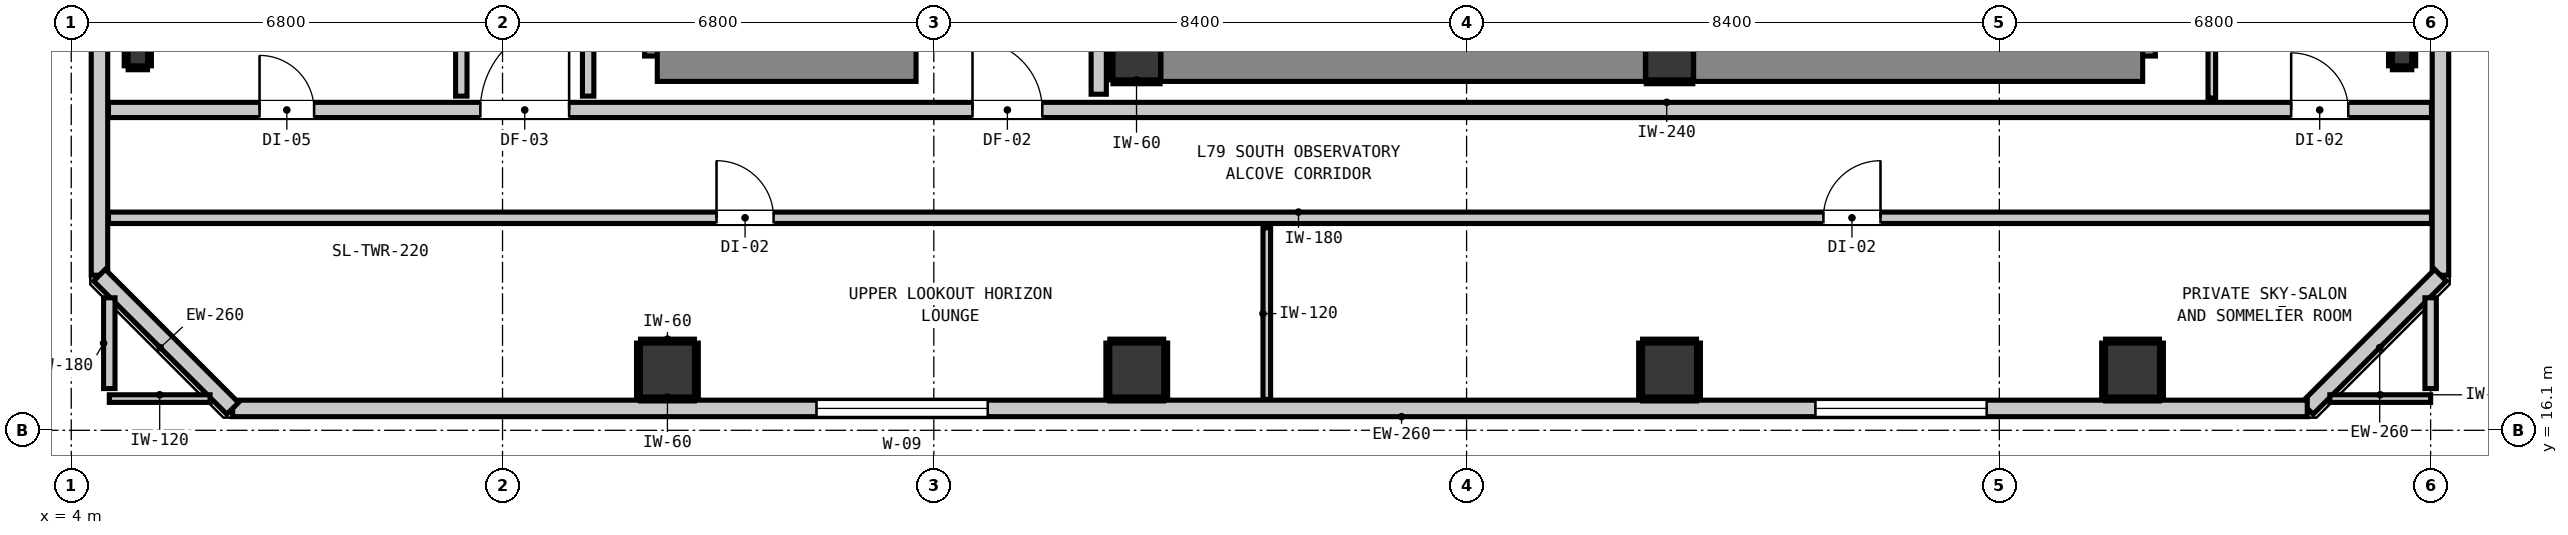
"""IFC4 building model, lengths in metres.
Left out: names, types, materials, properties, quantities, classifications, styles, units other than length and angle.
Written with IfcOpenShell. Run it as: python <this file> out.ifc"""

import sys

from ifc_helpers import new_model, si_unit, direction, frame, frame_2d, origin, origin_2d, place, context, subcontext, project, spatial, rectangle, i_section, extrude, element, fill, save


model = new_model("IFC4")
c1 = context("Model", 3, precision=1e-05, world=origin(), true_north=direction((0.0, 1.0)))
c2 = subcontext(c1, "Body", "Model", "MODEL_VIEW")
j1 = project(units=[si_unit("LENGTHUNIT", "METRE"), si_unit("PLANEANGLEUNIT", "RADIAN")], contexts=[c1])
p1 = place(None, origin())
s1 = spatial("IfcSite", under=j1, at=p1, CompositionType="ELEMENT")
p2 = place(p1, origin())
s2 = spatial("IfcBuilding", under=s1, at=p2, CompositionType="ELEMENT")
p3 = place(p2, frame((0.0, 0.0, 273.48)))
s3 = spatial("IfcBuildingStorey", under=s2, at=p3, CompositionType="ELEMENT", Elevation=273.48)
for number, where, z_axis, x_axis in (
    (1, (20.8, 22.0, 0.0), (0.0, 0.0, 1.0), (1.0, 0.0, 0.0)),
    (2, (29.2, 22.0, 0.0), (0.0, 0.0, 1.0), (1.0, 0.0, 0.0)),
):
    element("IfcColumn", number, at=place(p3, frame(where, z_axis=z_axis, x_axis=x_axis)), inside=s3, PredefinedType="COLUMN", context=c2, shape_type="SweptSolid", body=[
        extrude(rectangle(XDim=0.75, YDim=0.75, at=origin_2d()), origin(), (0.0, 0.0, 1.0), 4.18),
    ])
p4 = place(p3, frame((13.44, 22.0, 0.0), z_axis=(0.0, 0.0, 1.0), x_axis=(0.0, 1.0, 0.0)))
e3 = element("IfcWall", 3, at=p4, inside=s3, PredefinedType="SHEAR", context=c2, shape_type="SweptSolid", body=[
    extrude(rectangle(XDim=8.32, YDim=0.8, at=frame_2d((4.16, 0.0))), origin(), (0.0, 0.0, 1.0), 4.6),
])
p5 = place(p3, frame((13.24, 22.0, 0.0), z_axis=(0.0, 0.0, 1.0), x_axis=(1.0, 0.0, 0.0)))
e4 = element("IfcWall", 4, at=p5, inside=s3, PredefinedType="SHEAR", context=c2, shape_type="SweptSolid", body=[
    extrude(rectangle(XDim=4.08, YDim=0.8, at=frame_2d((2.04, 0.0))), origin(), (0.0, 0.0, 1.0), 4.6),
])
p6 = place(p3, frame((36.46, 22.0, 0.0), z_axis=(0.0, 0.0, 1.0), x_axis=(0.0, 1.0, 0.0)))
e5 = element("IfcWall", 5, at=p6, inside=s3, PredefinedType="SHEAR", context=c2, shape_type="SweptSolid", body=[
    extrude(rectangle(XDim=8.32, YDim=0.8, at=frame_2d((4.16, 0.0))), origin(), (0.0, 0.0, 1.0), 4.6),
])
p7 = place(p3, frame((29.58, 22.0, 0.0), z_axis=(0.0, 0.0, 1.0), x_axis=(1.0, 0.0, 0.0)))
e6 = element("IfcWall", 6, at=p7, inside=s3, PredefinedType="SHEAR", context=c2, shape_type="SweptSolid", body=[
    extrude(rectangle(XDim=7.08, YDim=0.8, at=frame_2d((3.54, 0.0))), origin(), (0.0, 0.0, 1.0), 4.6),
])
p8 = place(p3, frame((21.18, 22.0, 0.0), z_axis=(0.0, 0.0, 1.0), x_axis=(1.0, 0.0, 0.0)))
e7 = element("IfcWall", 7, at=p8, inside=s3, PredefinedType="SHEAR", context=c2, shape_type="SweptSolid", body=[
    extrude(rectangle(XDim=7.64, YDim=0.8, at=frame_2d((3.82, 0.0))), origin(), (0.0, 0.0, 1.0), 4.6),
])
for number, where, z_axis, x_axis in (
    (8, (13.4, 17.05, 0.0), (0.0, 0.0, 1.0), (1.0, 0.0, 0.0)),
    (9, (20.8, 17.05, 0.0), (0.0, 0.0, 1.0), (1.0, 0.0, 0.0)),
    (10, (29.2, 17.05, 0.0), (0.0, 0.0, 1.0), (1.0, 0.0, 0.0)),
    (11, (36.5, 17.05, 0.0), (0.0, 0.0, 1.0), (1.0, 0.0, 0.0)),
):
    element("IfcColumn", number, at=place(p3, frame(where, z_axis=z_axis, x_axis=x_axis)), inside=s3, PredefinedType="COLUMN", context=c2, shape_type="SweptSolid", body=[
        extrude(rectangle(XDim=0.85, YDim=0.85, at=origin_2d()), origin(), (0.0, 0.0, 1.0), 4.18),
    ])
for number, where, z_axis, x_axis in (
    (12, (5.05, 22.0, 0.0), (0.0, 0.0, 1.0), (1.0, 0.0, 0.0)),
    (13, (40.75, 22.0, 0.0), (0.0, 0.0, 1.0), (1.0, 0.0, 0.0)),
):
    element("IfcColumn", number, at=place(p3, frame(where, z_axis=z_axis, x_axis=x_axis)), inside=s3, PredefinedType="COLUMN", context=c2, shape_type="SweptSolid", body=[
        extrude(i_section(OverallWidth=0.305, OverallDepth=0.308, WebThickness=0.01, FlangeThickness=0.015, at=origin_2d()), origin(), (0.0, 0.0, 1.0), 4.18),
    ])
p9 = place(p3, frame((4.445, 18.545, 0.0), z_axis=(0.0, 0.0, 1.0), x_axis=(0.0, 1.0, 0.0)))
e14 = element("IfcWall", 14, at=p9, inside=s3, PredefinedType="STANDARD", context=c2, shape_type="SweptSolid", body=[
    extrude(rectangle(XDim=30.31, YDim=0.26, at=frame_2d((15.155, 0.0))), origin(), (0.0, 0.0, 1.0), 4.18),
])
p10 = place(p9, frame((25.512, 0.0, 0.85)))
e15 = element("IfcOpeningElement", 15, at=p10, cuts=e14, PredefinedType="OPENING", context=c2, shape_type="SweptSolid", body=[
    extrude(rectangle(XDim=2.7, YDim=2.0, at=frame_2d((1.35, 1.0))), frame((0.0, 0.14, 0.0), z_axis=(0.0, -1.0, 0.0), x_axis=(1.0, 0.0, 0.0)), (0.0, 0.0, 1.0), 0.28),
])
p11 = place(p3, frame((41.355, 48.855, 0.0), z_axis=(0.0, 0.0, 1.0), x_axis=(0.0, -1.0, 0.0)))
e16 = element("IfcWall", 16, at=p11, inside=s3, PredefinedType="STANDARD", context=c2, shape_type="SweptSolid", body=[
    extrude(rectangle(XDim=30.31, YDim=0.26, at=frame_2d((15.155, 0.0))), origin(), (0.0, 0.0, 1.0), 4.18),
])
p12 = place(p11, frame((21.155, 0.0, 0.85)))
e17 = element("IfcOpeningElement", 17, at=p12, cuts=e16, PredefinedType="OPENING", context=c2, shape_type="SweptSolid", body=[
    extrude(rectangle(XDim=2.7, YDim=2.0, at=frame_2d((1.35, 1.0))), frame((0.0, 0.14, 0.0), z_axis=(0.0, -1.0, 0.0), x_axis=(1.0, 0.0, 0.0)), (0.0, 0.0, 1.0), 0.28),
])
p13 = place(p11, frame((12.135, 0.0, 0.85)))
e18 = element("IfcOpeningElement", 18, at=p13, cuts=e16, PredefinedType="OPENING", context=c2, shape_type="SweptSolid", body=[
    extrude(rectangle(XDim=2.7, YDim=2.0, at=frame_2d((1.35, 1.0))), frame((0.0, 0.14, 0.0), z_axis=(0.0, -1.0, 0.0), x_axis=(1.0, 0.0, 0.0)), (0.0, 0.0, 1.0), 0.28),
])
p14 = place(p3, frame((41.355, 18.545, 0.0), z_axis=(0.0, 0.0, 1.0), x_axis=(-0.707147883682, -0.707065676302, 0.0)))
e19 = element("IfcWall", 19, at=p14, inside=s3, PredefinedType="STANDARD", context=c2, shape_type="SweptSolid", body=[
    extrude(rectangle(XDim=2.97, YDim=0.26, at=frame_2d((1.485, 0.0))), origin(), (0.0, 0.0, 1.0), 4.18),
])
p15 = place(p3, frame((39.255, 16.445, 0.0), z_axis=(0.0, 0.0, 1.0), x_axis=(-1.0, 0.0, 0.0)))
e20 = element("IfcWall", 20, at=p15, inside=s3, PredefinedType="STANDARD", context=c2, shape_type="SweptSolid", body=[
    extrude(rectangle(XDim=32.71, YDim=0.26, at=frame_2d((16.355, 0.0))), origin(), (0.0, 0.0, 1.0), 4.18),
])
p16 = place(p15, frame((20.805, 0.0, 0.85)))
e21 = element("IfcOpeningElement", 21, at=p16, cuts=e20, PredefinedType="OPENING", context=c2, shape_type="SweptSolid", body=[
    extrude(rectangle(XDim=2.7, YDim=2.0, at=frame_2d((1.35, 1.0))), frame((0.0, 0.14, 0.0), z_axis=(0.0, -1.0, 0.0), x_axis=(1.0, 0.0, 0.0)), (0.0, 0.0, 1.0), 0.28),
])
p17 = place(p15, frame((5.055, 0.0, 0.85)))
e22 = element("IfcOpeningElement", 22, at=p17, cuts=e20, PredefinedType="OPENING", context=c2, shape_type="SweptSolid", body=[
    extrude(rectangle(XDim=2.7, YDim=2.0, at=frame_2d((1.35, 1.0))), frame((0.0, 0.14, 0.0), z_axis=(0.0, -1.0, 0.0), x_axis=(1.0, 0.0, 0.0)), (0.0, 0.0, 1.0), 0.28),
])
p18 = place(p3, frame((6.545, 16.445, 0.0), z_axis=(0.0, 0.0, 1.0), x_axis=(-0.707106781187, 0.707106781187, 0.0)))
e23 = element("IfcWall", 23, at=p18, inside=s3, PredefinedType="STANDARD", context=c2, shape_type="SweptSolid", body=[
    extrude(rectangle(XDim=2.97, YDim=0.26, at=frame_2d((1.485, 0.0))), origin(), (0.0, 0.0, 1.0), 4.18),
])
p19 = place(p3, frame((4.587, 21.15, 0.0), z_axis=(0.0, 0.0, 1.0), x_axis=(1.0, 0.0, 0.0)))
e24 = element("IfcWall", 24, at=p19, inside=s3, PredefinedType="PARTITIONING", context=c2, shape_type="SweptSolid", body=[
    extrude(rectangle(XDim=36.626, YDim=0.24, at=frame_2d((18.313, 0.0))), origin(), (0.0, 0.0, 1.0), 4.18),
])
p20 = place(p19, frame((13.623, 0.0, 0.0)))
e25 = element("IfcOpeningElement", 25, at=p20, cuts=e24, PredefinedType="OPENING", context=c2, shape_type="SweptSolid", body=[
    extrude(rectangle(XDim=1.1, YDim=2.15, at=frame_2d((0.55, 1.075))), frame((0.0, 0.13, 0.0), z_axis=(0.0, -1.0, 0.0), x_axis=(1.0, 0.0, 0.0)), (0.0, 0.0, 1.0), 0.26),
])
p21 = place(p19, frame((5.863, 0.0, 0.0)))
e26 = element("IfcOpeningElement", 26, at=p21, cuts=e24, PredefinedType="OPENING", context=c2, shape_type="SweptSolid", body=[
    extrude(rectangle(XDim=1.4, YDim=2.15, at=frame_2d((0.7, 1.075))), frame((0.0, 0.13, 0.0), z_axis=(0.0, -1.0, 0.0), x_axis=(1.0, 0.0, 0.0)), (0.0, 0.0, 1.0), 0.26),
])
p22 = place(p19, frame((2.382, 0.0, 0.0)))
e27 = element("IfcOpeningElement", 27, at=p22, cuts=e24, PredefinedType="OPENING", context=c2, shape_type="SweptSolid", body=[
    extrude(rectangle(XDim=0.86, YDim=2.02, at=frame_2d((0.43, 1.01))), frame((0.0, 0.13, 0.0), z_axis=(0.0, -1.0, 0.0), x_axis=(1.0, 0.0, 0.0)), (0.0, 0.0, 1.0), 0.26),
])
p23 = place(p19, frame((34.414, 0.0, 0.0)))
e28 = element("IfcOpeningElement", 28, at=p23, cuts=e24, PredefinedType="OPENING", context=c2, shape_type="SweptSolid", body=[
    extrude(rectangle(XDim=0.9, YDim=2.1, at=frame_2d((0.45, 1.05))), frame((0.0, 0.13, 0.0), z_axis=(0.0, -1.0, 0.0), x_axis=(1.0, 0.0, 0.0)), (0.0, 0.0, 1.0), 0.26),
])
p24 = place(p3, frame((4.587, 19.45, 0.0), z_axis=(0.0, 0.0, 1.0), x_axis=(1.0, 0.0, 0.0)))
e29 = element("IfcWall", 29, at=p24, inside=s3, PredefinedType="PARTITIONING", context=c2, shape_type="SweptSolid", body=[
    extrude(rectangle(XDim=36.626, YDim=0.18, at=frame_2d((18.313, 0.0))), origin(), (0.0, 0.0, 1.0), 4.18),
])
p25 = place(p24, frame((9.587, 0.0, 0.0)))
e30 = element("IfcOpeningElement", 30, at=p25, cuts=e29, PredefinedType="OPENING", context=c2, shape_type="SweptSolid", body=[
    extrude(rectangle(XDim=0.9, YDim=2.1, at=frame_2d((0.45, 1.05))), frame((0.0, 0.1, 0.0), z_axis=(0.0, -1.0, 0.0), x_axis=(1.0, 0.0, 0.0)), (0.0, 0.0, 1.0), 0.2),
])
p26 = place(p24, frame((27.039, 0.0, 0.0)))
e31 = element("IfcOpeningElement", 31, at=p26, cuts=e29, PredefinedType="OPENING", context=c2, shape_type="SweptSolid", body=[
    extrude(rectangle(XDim=0.9, YDim=2.1, at=frame_2d((0.45, 1.05))), frame((0.0, 0.1, 0.0), z_axis=(0.0, -1.0, 0.0), x_axis=(1.0, 0.0, 0.0)), (0.0, 0.0, 1.0), 0.2),
])
for number, where, z_axis, x_axis in (
    (32, (4.6, 16.6, 0.0), (0.0, 0.0, 1.0), (1.0, 0.0, 0.0)),
    (33, (39.611, 16.6, 0.0), (0.0, 0.0, 1.0), (1.0, 0.0, 0.0)),
):
    element("IfcWall", number, at=place(p3, frame(where, z_axis=z_axis, x_axis=x_axis)), inside=s3, PredefinedType="PARTITIONING", context=c2, shape_type="SweptSolid", body=[
        extrude(rectangle(XDim=1.589, YDim=0.12, at=frame_2d((0.794, 0.0))), origin(), (0.0, 0.0, 1.0), 4.18),
    ])
p27 = place(p3, frame((20.2, 21.398, 0.0), z_axis=(0.0, 0.0, 1.0), x_axis=(0.0, 1.0, 0.0)))
e34 = element("IfcWall", 34, at=p27, inside=s3, PredefinedType="PARTITIONING", context=c2, shape_type="SweptSolid", body=[
    extrude(rectangle(XDim=6.754, YDim=0.24, at=frame_2d((3.377, 0.0))), origin(), (0.0, 0.0, 1.0), 1.965),
])
p28 = place(p3, frame((4.6, 16.758, 0.0), z_axis=(0.0, 0.0, 1.0), x_axis=(0.0, 1.0, 0.0)))
e35 = element("IfcWall", 35, at=p28, inside=s3, PredefinedType="PARTITIONING", context=c2, shape_type="SweptSolid", body=[
    extrude(rectangle(XDim=1.431, YDim=0.18, at=frame_2d((0.715, 0.0))), origin(), (0.0, 0.0, 1.0), 4.18),
])
p29 = place(p3, frame((10.15, 21.368, 0.0), z_axis=(0.0, 0.0, 1.0), x_axis=(0.0, 1.0, 0.0)))
e36 = element("IfcWall", 36, at=p29, inside=s3, PredefinedType="PARTITIONING", context=c2, shape_type="SweptSolid", body=[
    extrude(rectangle(XDim=4.864, YDim=0.18, at=frame_2d((2.432, 0.0))), origin(), (0.0, 0.0, 1.0), 4.18),
])
p30 = place(p3, frame((12.15, 21.368, 0.0), z_axis=(0.0, 0.0, 1.0), x_axis=(0.0, 1.0, 0.0)))
e37 = element("IfcWall", 37, at=p30, inside=s3, PredefinedType="PARTITIONING", context=c2, shape_type="SweptSolid", body=[
    extrude(rectangle(XDim=18.694, YDim=0.18, at=frame_2d((9.347, 0.0))), origin(), (0.0, 0.0, 1.0), 4.18),
])
p31 = place(p3, frame((41.2, 16.758, 0.0), z_axis=(0.0, 0.0, 1.0), x_axis=(0.0, 1.0, 0.0)))
e38 = element("IfcWall", 38, at=p31, inside=s3, PredefinedType="PARTITIONING", context=c2, shape_type="SweptSolid", body=[
    extrude(rectangle(XDim=1.431, YDim=0.18, at=frame_2d((0.715, 0.0))), origin(), (0.0, 0.0, 1.0), 4.18),
])
p32 = place(p3, frame((22.85, 16.587, 0.0), z_axis=(0.0, 0.0, 1.0), x_axis=(0.0, 1.0, 0.0)))
e39 = element("IfcWall", 39, at=p32, inside=s3, PredefinedType="PARTITIONING", context=c2, shape_type="SweptSolid", body=[
    extrude(rectangle(XDim=2.705, YDim=0.12, at=frame_2d((1.353, 0.0))), origin(), (0.0, 0.0, 1.0), 4.18),
])
p33 = place(p3, frame((37.75, 21.338, 0.0), z_axis=(0.0, 0.0, 1.0), x_axis=(0.0, 1.0, 0.0)))
e40 = element("IfcWall", 40, at=p33, inside=s3, PredefinedType="PARTITIONING", context=c2, shape_type="SweptSolid", body=[
    extrude(rectangle(XDim=10.154, YDim=0.12, at=frame_2d((5.077, 0.0))), origin(), (0.0, 0.0, 1.0), 4.18),
])
p34 = place(p3, frame((20.425, 21.593, 0.0), z_axis=(0.0, 0.0, 1.0), x_axis=(1.0, 0.0, 0.0)))
e41 = element("IfcWall", 41, at=p34, inside=s3, PredefinedType="PARTITIONING", context=c2, shape_type="SweptSolid", body=[
    extrude(rectangle(XDim=0.742, YDim=0.06, at=frame_2d((0.371, 0.0))), origin(), (0.0, 0.0, 1.0), 1.45),
])
p35 = place(p3, frame((20.393, 21.625, 0.0), z_axis=(0.0, 0.0, 1.0), x_axis=(0.0, 1.0, 0.0)))
e42 = element("IfcWall", 42, at=p35, inside=s3, PredefinedType="PARTITIONING", context=c2, shape_type="SweptSolid", body=[
    extrude(rectangle(XDim=0.75, YDim=0.06, at=frame_2d((0.375, 0.0))), origin(), (0.0, 0.0, 1.0), 1.45),
])
p36 = place(p3, frame((28.833, 21.593, 0.0), z_axis=(0.0, 0.0, 1.0), x_axis=(1.0, 0.0, 0.0)))
e43 = element("IfcWall", 43, at=p36, inside=s3, PredefinedType="PARTITIONING", context=c2, shape_type="SweptSolid", body=[
    extrude(rectangle(XDim=0.734, YDim=0.06, at=frame_2d((0.367, 0.0))), origin(), (0.0, 0.0, 1.0), 1.45),
])
for number, where, z_axis, x_axis in (
    (44, (12.975, 16.593, 0.0), (0.0, 0.0, 1.0), (1.0, 0.0, 0.0)),
    (45, (12.975, 17.507, 0.0), (0.0, 0.0, 1.0), (1.0, 0.0, 0.0)),
):
    element("IfcWall", number, at=place(p3, frame(where, z_axis=z_axis, x_axis=x_axis)), inside=s3, PredefinedType="PARTITIONING", context=c2, shape_type="SweptSolid", body=[
        extrude(rectangle(XDim=0.85, YDim=0.06, at=frame_2d((0.425, 0.0))), origin(), (0.0, 0.0, 1.0), 1.45),
    ])
for number, where, z_axis, x_axis in (
    (46, (12.943, 16.625, 0.0), (0.0, 0.0, 1.0), (0.0, 1.0, 0.0)),
    (47, (13.857, 16.625, 0.0), (0.0, 0.0, 1.0), (0.0, 1.0, 0.0)),
    (48, (20.375, 16.593, 0.0), (0.0, 0.0, 1.0), (1.0, 0.0, 0.0)),
    (49, (20.375, 17.507, 0.0), (0.0, 0.0, 1.0), (1.0, 0.0, 0.0)),
    (50, (20.343, 16.625, 0.0), (0.0, 0.0, 1.0), (0.0, 1.0, 0.0)),
    (51, (21.257, 16.625, 0.0), (0.0, 0.0, 1.0), (0.0, 1.0, 0.0)),
    (52, (28.775, 16.593, 0.0), (0.0, 0.0, 1.0), (1.0, 0.0, 0.0)),
    (53, (28.775, 17.507, 0.0), (0.0, 0.0, 1.0), (1.0, 0.0, 0.0)),
    (54, (28.743, 16.625, 0.0), (0.0, 0.0, 1.0), (0.0, 1.0, 0.0)),
    (55, (29.657, 16.625, 0.0), (0.0, 0.0, 1.0), (0.0, 1.0, 0.0)),
    (56, (36.075, 16.593, 0.0), (0.0, 0.0, 1.0), (1.0, 0.0, 0.0)),
    (57, (36.075, 17.507, 0.0), (0.0, 0.0, 1.0), (1.0, 0.0, 0.0)),
    (58, (36.043, 16.625, 0.0), (0.0, 0.0, 1.0), (0.0, 1.0, 0.0)),
    (59, (36.957, 16.625, 0.0), (0.0, 0.0, 1.0), (0.0, 1.0, 0.0)),
):
    element("IfcWall", number, at=place(p3, frame(where, z_axis=z_axis, x_axis=x_axis)), inside=s3, PredefinedType="PARTITIONING", context=c2, shape_type="SweptSolid", body=[
        extrude(rectangle(XDim=0.85, YDim=0.06, at=frame_2d((0.425, 0.0))), origin(), (0.0, 0.0, 1.0), 1.45),
    ])
p37 = place(p3, frame((4.897, 21.814, 0.0), z_axis=(0.0, 0.0, 1.0), x_axis=(1.0, 0.0, 0.0)))
e60 = element("IfcWall", 60, at=p37, inside=s3, PredefinedType="PARTITIONING", context=c2, shape_type="SweptSolid", body=[
    extrude(rectangle(XDim=0.305, YDim=0.06, at=frame_2d((0.152, 0.0))), origin(), (0.0, 0.0, 1.0), 1.45),
])
for number, where, z_axis, x_axis in (
    (61, (4.865, 21.846, 0.0), (0.0, 0.0, 1.0), (0.0, 1.0, 0.0)),
    (62, (5.234, 21.846, 0.0), (0.0, 0.0, 1.0), (0.0, 1.0, 0.0)),
):
    element("IfcWall", number, at=place(p3, frame(where, z_axis=z_axis, x_axis=x_axis)), inside=s3, PredefinedType="PARTITIONING", context=c2, shape_type="SweptSolid", body=[
        extrude(rectangle(XDim=0.308, YDim=0.06, at=frame_2d((0.154, 0.0))), origin(), (0.0, 0.0, 1.0), 1.45),
    ])
p38 = place(p3, frame((40.597, 21.814, 0.0), z_axis=(0.0, 0.0, 1.0), x_axis=(1.0, 0.0, 0.0)))
e63 = element("IfcWall", 63, at=p38, inside=s3, PredefinedType="PARTITIONING", context=c2, shape_type="SweptSolid", body=[
    extrude(rectangle(XDim=0.306, YDim=0.06, at=frame_2d((0.153, 0.0))), origin(), (0.0, 0.0, 1.0), 1.45),
])
for number, where, z_axis, x_axis in (
    (64, (40.566, 21.846, 0.0), (0.0, 0.0, 1.0), (0.0, 1.0, 0.0)),
    (65, (40.934, 21.846, 0.0), (0.0, 0.0, 1.0), (0.0, 1.0, 0.0)),
):
    element("IfcWall", number, at=place(p3, frame(where, z_axis=z_axis, x_axis=x_axis)), inside=s3, PredefinedType="PARTITIONING", context=c2, shape_type="SweptSolid", body=[
        extrude(rectangle(XDim=0.308, YDim=0.06, at=frame_2d((0.154, 0.0))), origin(), (0.0, 0.0, 1.0), 1.45),
    ])
p39 = place(p16, origin())
e66 = element("IfcWindow", 66, at=p39, inside=s3, PartitioningType="SINGLE_PANEL", PredefinedType="WINDOW", context=c2, shape_type="SweptSolid", body=[
    extrude(rectangle(XDim=2.7, YDim=2.0, at=frame_2d((1.35, 1.0))), frame((0.0, 0.03, 0.0), z_axis=(0.0, -1.0, 0.0), x_axis=(1.0, 0.0, 0.0)), (0.0, 0.0, 1.0), 0.06),
])
fill(e21, e66)
p40 = place(p17, origin())
e67 = element("IfcWindow", 67, at=p40, inside=s3, PartitioningType="SINGLE_PANEL", PredefinedType="WINDOW", context=c2, shape_type="SweptSolid", body=[
    extrude(rectangle(XDim=2.7, YDim=2.0, at=frame_2d((1.35, 1.0))), frame((0.0, 0.03, 0.0), z_axis=(0.0, -1.0, 0.0), x_axis=(1.0, 0.0, 0.0)), (0.0, 0.0, 1.0), 0.06),
])
fill(e22, e67)
p41 = place(p20, origin())
e68 = element("IfcDoor", 68, at=p41, inside=s3, OperationType="SINGLE_SWING_LEFT", PredefinedType="DOOR", context=c2, shape_type="SweptSolid", body=[
    extrude(rectangle(XDim=1.1, YDim=2.15, at=frame_2d((0.55, 1.075))), frame((0.0, 0.025, 0.0), z_axis=(0.0, -1.0, 0.0), x_axis=(1.0, 0.0, 0.0)), (0.0, 0.0, 1.0), 0.05),
])
fill(e25, e68)
p42 = place(p21, origin())
e69 = element("IfcDoor", 69, at=p42, inside=s3, OperationType="SINGLE_SWING_RIGHT", PredefinedType="DOOR", context=c2, shape_type="SweptSolid", body=[
    extrude(rectangle(XDim=1.4, YDim=2.15, at=frame_2d((0.7, 1.075))), frame((0.0, 0.025, 0.0), z_axis=(0.0, -1.0, 0.0), x_axis=(1.0, 0.0, 0.0)), (0.0, 0.0, 1.0), 0.05),
])
fill(e26, e69)
p43 = place(p25, origin())
e70 = element("IfcDoor", 70, at=p43, inside=s3, OperationType="SINGLE_SWING_LEFT", PredefinedType="DOOR", context=c2, shape_type="SweptSolid", body=[
    extrude(rectangle(XDim=0.9, YDim=2.1, at=frame_2d((0.45, 1.05))), frame((0.0, 0.025, 0.0), z_axis=(0.0, -1.0, 0.0), x_axis=(1.0, 0.0, 0.0)), (0.0, 0.0, 1.0), 0.05),
])
fill(e30, e70)
p44 = place(p26, origin())
e71 = element("IfcDoor", 71, at=p44, inside=s3, OperationType="SINGLE_SWING_RIGHT", PredefinedType="DOOR", context=c2, shape_type="SweptSolid", body=[
    extrude(rectangle(XDim=0.9, YDim=2.1, at=frame_2d((0.45, 1.05))), frame((0.0, 0.025, 0.0), z_axis=(0.0, -1.0, 0.0), x_axis=(1.0, 0.0, 0.0)), (0.0, 0.0, 1.0), 0.05),
])
fill(e31, e71)
p45 = place(p22, origin())
e72 = element("IfcDoor", 72, at=p45, inside=s3, OperationType="SINGLE_SWING_LEFT", PredefinedType="DOOR", context=c2, shape_type="SweptSolid", body=[
    extrude(rectangle(XDim=0.86, YDim=2.02, at=frame_2d((0.43, 1.01))), frame((0.0, 0.025, 0.0), z_axis=(0.0, -1.0, 0.0), x_axis=(1.0, 0.0, 0.0)), (0.0, 0.0, 1.0), 0.05),
])
fill(e27, e72)
p46 = place(p23, origin())
e73 = element("IfcDoor", 73, at=p46, inside=s3, OperationType="SINGLE_SWING_LEFT", PredefinedType="DOOR", context=c2, shape_type="SweptSolid", body=[
    extrude(rectangle(XDim=0.9, YDim=2.1, at=frame_2d((0.45, 1.05))), frame((0.0, 0.025, 0.0), z_axis=(0.0, -1.0, 0.0), x_axis=(1.0, 0.0, 0.0)), (0.0, 0.0, 1.0), 0.05),
])
fill(e28, e73)
save(model, sys.argv[1])
